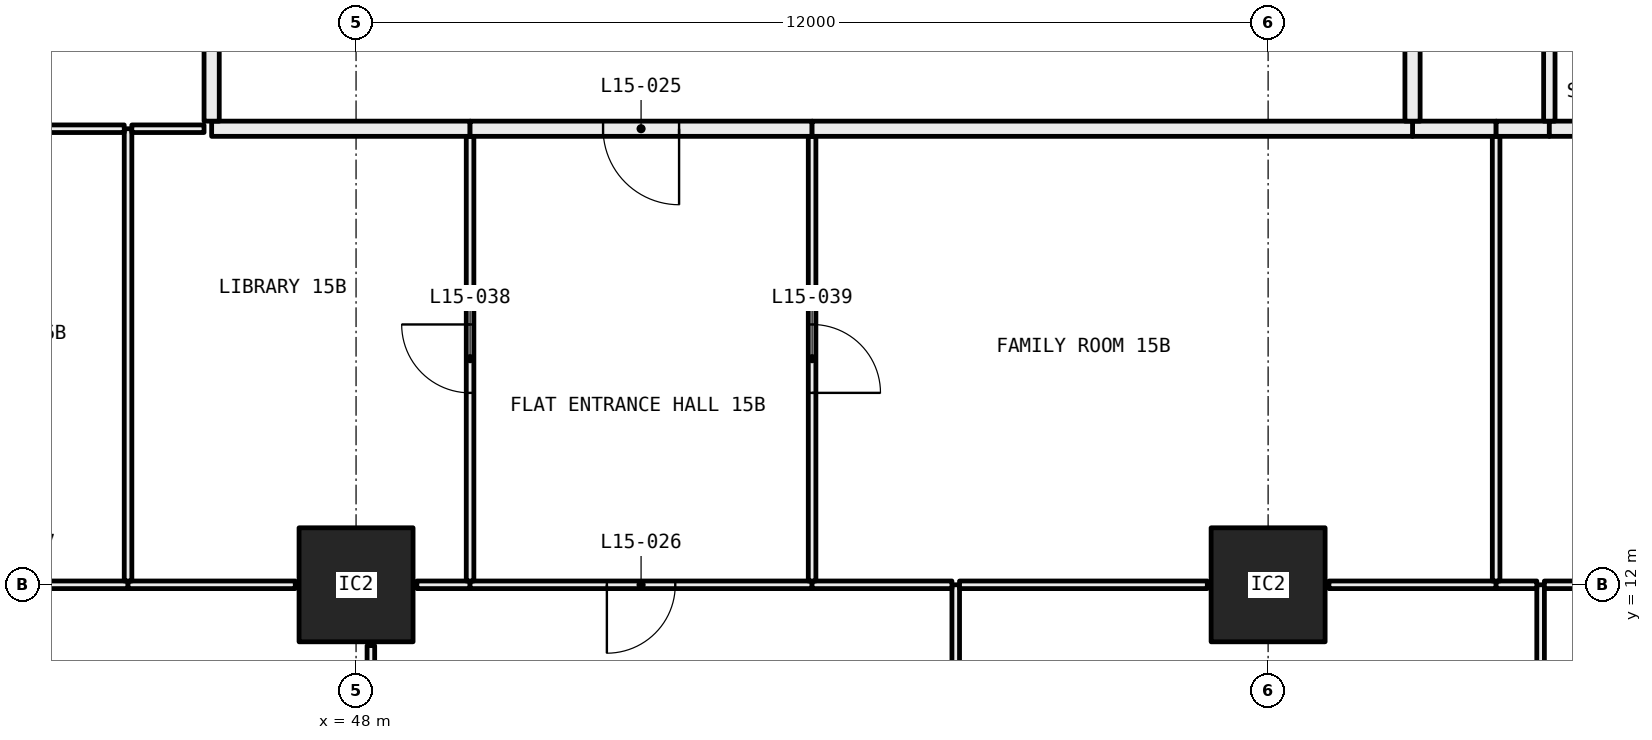
"""IFC4 building model, lengths in metres.
Left out: names, types, materials, properties, quantities, classifications, styles, units other than length and angle.
Written with IfcOpenShell. Run it as: python <this file> out.ifc"""

import sys

from ifc_helpers import new_model, si_unit, direction, frame, frame_2d, origin, origin_2d, place, context, subcontext, project, spatial, rectangle, hollow_rectangle, extrude, element, fill, save


model = new_model("IFC4")
c1 = context("Model", 3, precision=1e-05, world=origin(), true_north=direction((0.0, 1.0)))
c2 = subcontext(c1, "Body", "Model", "MODEL_VIEW")
j1 = project(units=[si_unit("LENGTHUNIT", "METRE"), si_unit("PLANEANGLEUNIT", "RADIAN")], contexts=[c1])
p1 = place(None, origin())
s1 = spatial("IfcSite", under=j1, at=p1, CompositionType="ELEMENT")
p2 = place(p1, origin())
s2 = spatial("IfcBuilding", under=s1, at=p2, CompositionType="ELEMENT")
p3 = place(p2, frame((0.0, 0.0, 64.5)))
s3 = spatial("IfcBuildingStorey", under=s2, at=p3, CompositionType="ELEMENT", Elevation=64.5)
for number, where, z_axis, x_axis in (
    (1, (48.0, 12.0, 0.0), (0.0, 0.0, 1.0), (1.0, 0.0, 0.0)),
    (2, (60.0, 12.0, 0.0), (0.0, 0.0, 1.0), (1.0, 0.0, 0.0)),
):
    element("IfcColumn", number, at=place(p3, frame(where, z_axis=z_axis, x_axis=x_axis)), inside=s3, PredefinedType="COLUMN", context=c2, shape_type="SweptSolid", body=[
        extrude(hollow_rectangle(XDim=1.5, YDim=1.5, WallThickness=0.065, at=origin_2d()), origin(), (0.0, 0.0, 1.0), 3.05),
    ])
p4 = place(p3, frame((48.195, 6.05, 0.0), z_axis=(0.0, 0.0, 1.0), x_axis=(0.0, 1.0, 0.0)))
e3 = element("IfcWall", 3, at=p4, inside=s3, PredefinedType="PARTITIONING", context=c2, shape_type="SweptSolid", body=[
    extrude(rectangle(XDim=5.15, YDim=0.1, at=frame_2d((2.575, 0.0))), origin(), (0.0, 0.0, 1.0), 3.05),
])
p5 = place(p4, frame((2.125, 0.0, 0.0)))
e4 = element("IfcOpeningElement", 4, at=p5, cuts=e3, PredefinedType="OPENING", context=c2, shape_type="SweptSolid", body=[
    extrude(rectangle(XDim=0.9, YDim=2.1, at=frame_2d((0.45, 1.05))), frame((0.0, 0.06, 0.0), z_axis=(0.0, -1.0, 0.0), x_axis=(1.0, 0.0, 0.0)), (0.0, 0.0, 1.0), 0.12),
])
p6 = place(p3, frame((45.0, 12.0, 0.0), z_axis=(0.0, 0.0, 1.0), x_axis=(-1.0, 0.0, 0.0)))
e5 = element("IfcWall", 5, at=p6, inside=s3, PredefinedType="PARTITIONING", context=c2, shape_type="SweptSolid", body=[
    extrude(rectangle(XDim=3.0, YDim=0.1, at=frame_2d((1.5, 0.0))), origin(), (0.0, 0.0, 1.0), 2.45),
])
p7 = place(p6, frame((1.05, 0.0, 0.0)))
e6 = element("IfcOpeningElement", 6, at=p7, cuts=e5, PredefinedType="OPENING", context=c2, shape_type="SweptSolid", body=[
    extrude(rectangle(XDim=0.9, YDim=2.1, at=frame_2d((0.45, 1.05))), frame((0.0, 0.06, 0.0), z_axis=(0.0, -1.0, 0.0), x_axis=(1.0, 0.0, 0.0)), (0.0, 0.0, 1.0), 0.12),
])
p8 = place(p3, frame((47.2, 12.0, 0.0), z_axis=(0.0, 0.0, 1.0), x_axis=(-1.0, 0.0, 0.0)))
e7 = element("IfcWall", 7, at=p8, inside=s3, PredefinedType="PARTITIONING", context=c2, shape_type="SweptSolid", body=[
    extrude(rectangle(XDim=2.2, YDim=0.1, at=frame_2d((1.1, 0.0))), origin(), (0.0, 0.0, 1.0), 2.45),
])
p9 = place(p3, frame((55.89, 6.05, 0.0), z_axis=(0.0, 0.0, 1.0), x_axis=(0.0, 1.0, 0.0)))
e8 = element("IfcWall", 8, at=p9, inside=s3, PredefinedType="PARTITIONING", context=c2, shape_type="SweptSolid", body=[
    extrude(rectangle(XDim=5.95, YDim=0.1, at=frame_2d((2.975, 0.0))), origin(), (0.0, 0.0, 1.0), 2.45),
])
p10 = place(p9, frame((2.525, 0.0, 0.0)))
e9 = element("IfcOpeningElement", 9, at=p10, cuts=e8, PredefinedType="OPENING", context=c2, shape_type="SweptSolid", body=[
    extrude(rectangle(XDim=0.9, YDim=2.1, at=frame_2d((0.45, 1.05))), frame((0.0, 0.06, 0.0), z_axis=(0.0, -1.0, 0.0), x_axis=(1.0, 0.0, 0.0)), (0.0, 0.0, 1.0), 0.12),
])
p11 = place(p3, frame((49.5, 12.0, 0.0), z_axis=(0.0, 0.0, 1.0), x_axis=(-1.0, 0.0, 0.0)))
e10 = element("IfcWall", 10, at=p11, inside=s3, PredefinedType="PARTITIONING", context=c2, shape_type="SweptSolid", body=[
    extrude(rectangle(XDim=0.7, YDim=0.1, at=frame_2d((0.35, 0.0))), origin(), (0.0, 0.0, 1.0), 2.45),
])
p12 = place(p3, frame((54.0, 12.0, 0.0), z_axis=(0.0, 0.0, 1.0), x_axis=(-1.0, 0.0, 0.0)))
e11 = element("IfcWall", 11, at=p12, inside=s3, PredefinedType="PARTITIONING", context=c2, shape_type="SweptSolid", body=[
    extrude(rectangle(XDim=4.5, YDim=0.1, at=frame_2d((2.25, 0.0))), origin(), (0.0, 0.0, 1.0), 2.45),
])
p13 = place(p12, frame((1.8, 0.0, 0.0)))
e12 = element("IfcOpeningElement", 12, at=p13, cuts=e11, PredefinedType="OPENING", context=c2, shape_type="SweptSolid", body=[
    extrude(rectangle(XDim=0.9, YDim=2.1, at=frame_2d((0.45, 1.05))), frame((0.0, 0.06, 0.0), z_axis=(0.0, -1.0, 0.0), x_axis=(1.0, 0.0, 0.0)), (0.0, 0.0, 1.0), 0.12),
])
p14 = place(p3, frame((55.84, 12.0, 0.0), z_axis=(0.0, 0.0, 1.0), x_axis=(-1.0, 0.0, 0.0)))
e13 = element("IfcWall", 13, at=p14, inside=s3, PredefinedType="PARTITIONING", context=c2, shape_type="SweptSolid", body=[
    extrude(rectangle(XDim=1.84, YDim=0.1, at=frame_2d((0.92, 0.0))), origin(), (0.0, 0.0, 1.0), 2.45),
])
p15 = place(p3, frame((63.585, 6.05, 0.0), z_axis=(0.0, 0.0, 1.0), x_axis=(0.0, 1.0, 0.0)))
e14 = element("IfcWall", 14, at=p15, inside=s3, PredefinedType="PARTITIONING", context=c2, shape_type="SweptSolid", body=[
    extrude(rectangle(XDim=5.95, YDim=0.1, at=frame_2d((2.975, 0.0))), origin(), (0.0, 0.0, 1.0), 2.45),
])
p16 = place(p15, frame((2.525, 0.0, 0.0)))
e15 = element("IfcOpeningElement", 15, at=p16, cuts=e14, PredefinedType="OPENING", context=c2, shape_type="SweptSolid", body=[
    extrude(rectangle(XDim=0.9, YDim=2.1, at=frame_2d((0.45, 1.05))), frame((0.0, 0.06, 0.0), z_axis=(0.0, -1.0, 0.0), x_axis=(1.0, 0.0, 0.0)), (0.0, 0.0, 1.0), 0.12),
])
p17 = place(p3, frame((59.2, 12.0, 0.0), z_axis=(0.0, 0.0, 1.0), x_axis=(-1.0, 0.0, 0.0)))
e16 = element("IfcWall", 16, at=p17, inside=s3, PredefinedType="PARTITIONING", context=c2, shape_type="SweptSolid", body=[
    extrude(rectangle(XDim=3.26, YDim=0.1, at=frame_2d((1.63, 0.0))), origin(), (0.0, 0.0, 1.0), 2.45),
])
p18 = place(p3, frame((63.0, 12.0, 0.0), z_axis=(0.0, 0.0, 1.0), x_axis=(-1.0, 0.0, 0.0)))
e17 = element("IfcWall", 17, at=p18, inside=s3, PredefinedType="PARTITIONING", context=c2, shape_type="SweptSolid", body=[
    extrude(rectangle(XDim=2.2, YDim=0.1, at=frame_2d((1.1, 0.0))), origin(), (0.0, 0.0, 1.0), 2.45),
])
p19 = place(p3, frame((63.535, 12.0, 0.0), z_axis=(0.0, 0.0, 1.0), x_axis=(-1.0, 0.0, 0.0)))
e18 = element("IfcWall", 18, at=p19, inside=s3, PredefinedType="PARTITIONING", context=c2, shape_type="SweptSolid", body=[
    extrude(rectangle(XDim=0.535, YDim=0.1, at=frame_2d((0.268, 0.0))), origin(), (0.0, 0.0, 1.0), 2.45),
])
p20 = place(p3, frame((71.28, 12.0, 0.0), z_axis=(0.0, 0.0, 1.0), x_axis=(-1.0, 0.0, 0.0)))
e19 = element("IfcWall", 19, at=p20, inside=s3, PredefinedType="PARTITIONING", context=c2, shape_type="SweptSolid", body=[
    extrude(rectangle(XDim=7.645, YDim=0.1, at=frame_2d((3.823, 0.0))), origin(), (0.0, 0.0, 1.0), 2.45),
])
p21 = place(p20, frame((3.373, 0.0, 0.0)))
e20 = element("IfcOpeningElement", 20, at=p21, cuts=e19, PredefinedType="OPENING", context=c2, shape_type="SweptSolid", body=[
    extrude(rectangle(XDim=0.9, YDim=2.1, at=frame_2d((0.45, 1.05))), frame((0.0, 0.06, 0.0), z_axis=(0.0, -1.0, 0.0), x_axis=(1.0, 0.0, 0.0)), (0.0, 0.0, 1.0), 0.12),
])
p22 = place(p3, frame((45.0, 12.05, 0.0), z_axis=(0.0, 0.0, 1.0), x_axis=(0.0, 1.0, 0.0)))
e21 = element("IfcWall", 21, at=p22, inside=s3, PredefinedType="PARTITIONING", context=c2, shape_type="SweptSolid", body=[
    extrude(rectangle(XDim=5.95, YDim=0.1, at=frame_2d((2.975, 0.0))), origin(), (0.0, 0.0, 1.0), 2.45),
])
p23 = place(p3, frame((44.95, 18.0, 0.0), z_axis=(0.0, 0.0, 1.0), x_axis=(-1.0, 0.0, 0.0)))
e22 = element("IfcWall", 22, at=p23, inside=s3, PredefinedType="PARTITIONING", context=c2, shape_type="SweptSolid", body=[
    extrude(rectangle(XDim=2.9, YDim=0.1, at=frame_2d((1.45, 0.0))), origin(), (0.0, 0.0, 1.0), 3.05),
])
p24 = place(p3, frame((49.5, 12.05, 0.0), z_axis=(0.0, 0.0, 1.0), x_axis=(0.0, 1.0, 0.0)))
e23 = element("IfcWall", 23, at=p24, inside=s3, PredefinedType="PARTITIONING", context=c2, shape_type="SweptSolid", body=[
    extrude(rectangle(XDim=5.85, YDim=0.1, at=frame_2d((2.925, 0.0))), origin(), (0.0, 0.0, 1.0), 2.45),
])
p25 = place(p24, frame((2.475, 0.0, 0.0)))
e24 = element("IfcOpeningElement", 24, at=p25, cuts=e23, PredefinedType="OPENING", context=c2, shape_type="SweptSolid", body=[
    extrude(rectangle(XDim=0.9, YDim=2.1, at=frame_2d((0.45, 1.05))), frame((0.0, 0.06, 0.0), z_axis=(0.0, -1.0, 0.0), x_axis=(1.0, 0.0, 0.0)), (0.0, 0.0, 1.0), 0.12),
])
p26 = place(p3, frame((46.0, 18.0, 0.0), z_axis=(0.0, 0.0, 1.0), x_axis=(-1.0, 0.0, 0.0)))
e25 = element("IfcWall", 25, at=p26, inside=s3, PredefinedType="PARTITIONING", context=c2, shape_type="SweptSolid", body=[
    extrude(rectangle(XDim=0.95, YDim=0.1, at=frame_2d((0.475, 0.0))), origin(), (0.0, 0.0, 1.0), 3.05),
])
p27 = place(p3, frame((49.5, 18.0, 0.0), z_axis=(0.0, 0.0, 1.0), x_axis=(-1.0, 0.0, 0.0)))
e26 = element("IfcWall", 26, at=p27, inside=s3, PredefinedType="PARTITIONING", context=c2, shape_type="SweptSolid", body=[
    extrude(rectangle(XDim=3.4, YDim=0.2, at=frame_2d((1.7, 0.0))), origin(), (0.0, 0.0, 1.0), 3.05),
])
p28 = place(p3, frame((54.0, 12.05, 0.0), z_axis=(0.0, 0.0, 1.0), x_axis=(0.0, 1.0, 0.0)))
e27 = element("IfcWall", 27, at=p28, inside=s3, PredefinedType="PARTITIONING", context=c2, shape_type="SweptSolid", body=[
    extrude(rectangle(XDim=5.85, YDim=0.1, at=frame_2d((2.925, 0.0))), origin(), (0.0, 0.0, 1.0), 2.45),
])
p29 = place(p28, frame((2.475, 0.0, 0.0)))
e28 = element("IfcOpeningElement", 28, at=p29, cuts=e27, PredefinedType="OPENING", context=c2, shape_type="SweptSolid", body=[
    extrude(rectangle(XDim=0.9, YDim=2.1, at=frame_2d((0.45, 1.05))), frame((0.0, 0.06, 0.0), z_axis=(0.0, -1.0, 0.0), x_axis=(1.0, 0.0, 0.0)), (0.0, 0.0, 1.0), 0.12),
])
p30 = place(p3, frame((54.0, 18.0, 0.0), z_axis=(0.0, 0.0, 1.0), x_axis=(-1.0, 0.0, 0.0)))
e29 = element("IfcWall", 29, at=p30, inside=s3, PredefinedType="PARTITIONING", context=c2, shape_type="SweptSolid", body=[
    extrude(rectangle(XDim=4.5, YDim=0.2, at=frame_2d((2.25, 0.0))), origin(), (0.0, 0.0, 1.0), 3.05),
])
p31 = place(p30, frame((1.75, 0.0, 0.0)))
e30 = element("IfcOpeningElement", 30, at=p31, cuts=e29, PredefinedType="OPENING", context=c2, shape_type="SweptSolid", body=[
    extrude(rectangle(XDim=1.0, YDim=2.1, at=frame_2d((0.5, 1.05))), frame((0.0, 0.11, 0.0), z_axis=(0.0, -1.0, 0.0), x_axis=(1.0, 0.0, 0.0)), (0.0, 0.0, 1.0), 0.22),
])
p32 = place(p3, frame((63.0, 12.05, 0.0), z_axis=(0.0, 0.0, 1.0), x_axis=(0.0, 1.0, 0.0)))
e31 = element("IfcWall", 31, at=p32, inside=s3, PredefinedType="PARTITIONING", context=c2, shape_type="SweptSolid", body=[
    extrude(rectangle(XDim=5.85, YDim=0.1, at=frame_2d((2.925, 0.0))), origin(), (0.0, 0.0, 1.0), 2.45),
])
p33 = place(p3, frame((63.0, 18.0, 0.0), z_axis=(0.0, 0.0, 1.0), x_axis=(-1.0, 0.0, 0.0)))
e32 = element("IfcWall", 32, at=p33, inside=s3, PredefinedType="PARTITIONING", context=c2, shape_type="SweptSolid", body=[
    extrude(rectangle(XDim=1.1, YDim=0.2, at=frame_2d((0.55, 0.0))), origin(), (0.0, 0.0, 1.0), 3.05),
])
p34 = place(p3, frame((61.9, 18.0, 0.0), z_axis=(0.0, 0.0, 1.0), x_axis=(-1.0, 0.0, 0.0)))
e33 = element("IfcWall", 33, at=p34, inside=s3, PredefinedType="PARTITIONING", context=c2, shape_type="SweptSolid", body=[
    extrude(rectangle(XDim=7.9, YDim=0.2, at=frame_2d((3.95, 0.0))), origin(), (0.0, 0.0, 1.0), 3.05),
])
p35 = place(p3, frame((63.7, 18.0, 0.0), z_axis=(0.0, 0.0, 1.0), x_axis=(-1.0, 0.0, 0.0)))
e34 = element("IfcWall", 34, at=p35, inside=s3, PredefinedType="PARTITIONING", context=c2, shape_type="SweptSolid", body=[
    extrude(rectangle(XDim=0.7, YDim=0.2, at=frame_2d((0.35, 0.0))), origin(), (0.0, 0.0, 1.0), 3.05),
])
p36 = place(p3, frame((66.0, 18.0, 0.0), z_axis=(0.0, 0.0, 1.0), x_axis=(-1.0, 0.0, 0.0)))
e35 = element("IfcWall", 35, at=p36, inside=s3, PredefinedType="PARTITIONING", context=c2, shape_type="SweptSolid", body=[
    extrude(rectangle(XDim=2.3, YDim=0.2, at=frame_2d((1.15, 0.0))), origin(), (0.0, 0.0, 1.0), 3.05),
])
p37 = place(p3, frame((46.1, 18.1, 0.0), z_axis=(0.0, 0.0, 1.0), x_axis=(0.0, 1.0, 0.0)))
e36 = element("IfcWall", 36, at=p37, inside=s3, PredefinedType="PARTITIONING", context=c2, shape_type="SweptSolid", body=[
    extrude(rectangle(XDim=6.2, YDim=0.2, at=frame_2d((3.1, 0.0))), origin(), (0.0, 0.0, 1.0), 2.45),
])
p38 = place(p3, frame((63.7, 18.1, 0.0), z_axis=(0.0, 0.0, 1.0), x_axis=(0.0, 1.0, 0.0)))
e37 = element("IfcWall", 37, at=p38, inside=s3, PredefinedType="PARTITIONING", context=c2, shape_type="SweptSolid", body=[
    extrude(rectangle(XDim=2.9, YDim=0.15, at=frame_2d((1.45, 0.0))), origin(), (0.0, 0.0, 1.0), 3.05),
])
p39 = place(p3, frame((61.9, 21.0, 0.0), z_axis=(0.0, 0.0, 1.0), x_axis=(0.0, -1.0, 0.0)))
e38 = element("IfcWall", 38, at=p39, inside=s3, PredefinedType="PARTITIONING", context=c2, shape_type="SweptSolid", body=[
    extrude(rectangle(XDim=2.9, YDim=0.2, at=frame_2d((1.45, 0.0))), origin(), (0.0, 0.0, 1.0), 3.05),
])
p40 = place(p31, origin())
e39 = element("IfcDoor", 39, at=p40, inside=s3, OperationType="SINGLE_SWING_RIGHT", PredefinedType="DOOR", context=c2, shape_type="SweptSolid", body=[
    extrude(rectangle(XDim=1.0, YDim=2.1, at=frame_2d((0.5, 1.05))), frame((0.0, 0.025, 0.0), z_axis=(0.0, -1.0, 0.0), x_axis=(1.0, 0.0, 0.0)), (0.0, 0.0, 1.0), 0.05),
])
fill(e30, e39)
p41 = place(p13, origin())
e40 = element("IfcDoor", 40, at=p41, inside=s3, OperationType="SINGLE_SWING_LEFT", PredefinedType="DOOR", context=c2, shape_type="SweptSolid", body=[
    extrude(rectangle(XDim=0.9, YDim=2.1, at=frame_2d((0.45, 1.05))), frame((0.0, 0.025, 0.0), z_axis=(0.0, -1.0, 0.0), x_axis=(1.0, 0.0, 0.0)), (0.0, 0.0, 1.0), 0.05),
])
fill(e12, e40)
p42 = place(p25, origin())
e41 = element("IfcDoor", 41, at=p42, inside=s3, OperationType="SINGLE_SWING_LEFT", PredefinedType="DOOR", context=c2, shape_type="SweptSolid", body=[
    extrude(rectangle(XDim=0.9, YDim=2.1, at=frame_2d((0.45, 1.05))), frame((0.0, 0.025, 0.0), z_axis=(0.0, -1.0, 0.0), x_axis=(1.0, 0.0, 0.0)), (0.0, 0.0, 1.0), 0.05),
])
fill(e24, e41)
p43 = place(p29, frame((0.9, 0.0, 0.0), x_axis=(-1.0, 0.0, 0.0)))
e42 = element("IfcDoor", 42, at=p43, inside=s3, OperationType="SINGLE_SWING_LEFT", PredefinedType="DOOR", context=c2, shape_type="SweptSolid", body=[
    extrude(rectangle(XDim=0.9, YDim=2.1, at=frame_2d((0.45, 1.05))), frame((0.0, 0.025, 0.0), z_axis=(0.0, -1.0, 0.0), x_axis=(1.0, 0.0, 0.0)), (0.0, 0.0, 1.0), 0.05),
])
fill(e28, e42)
save(model, sys.argv[1])
